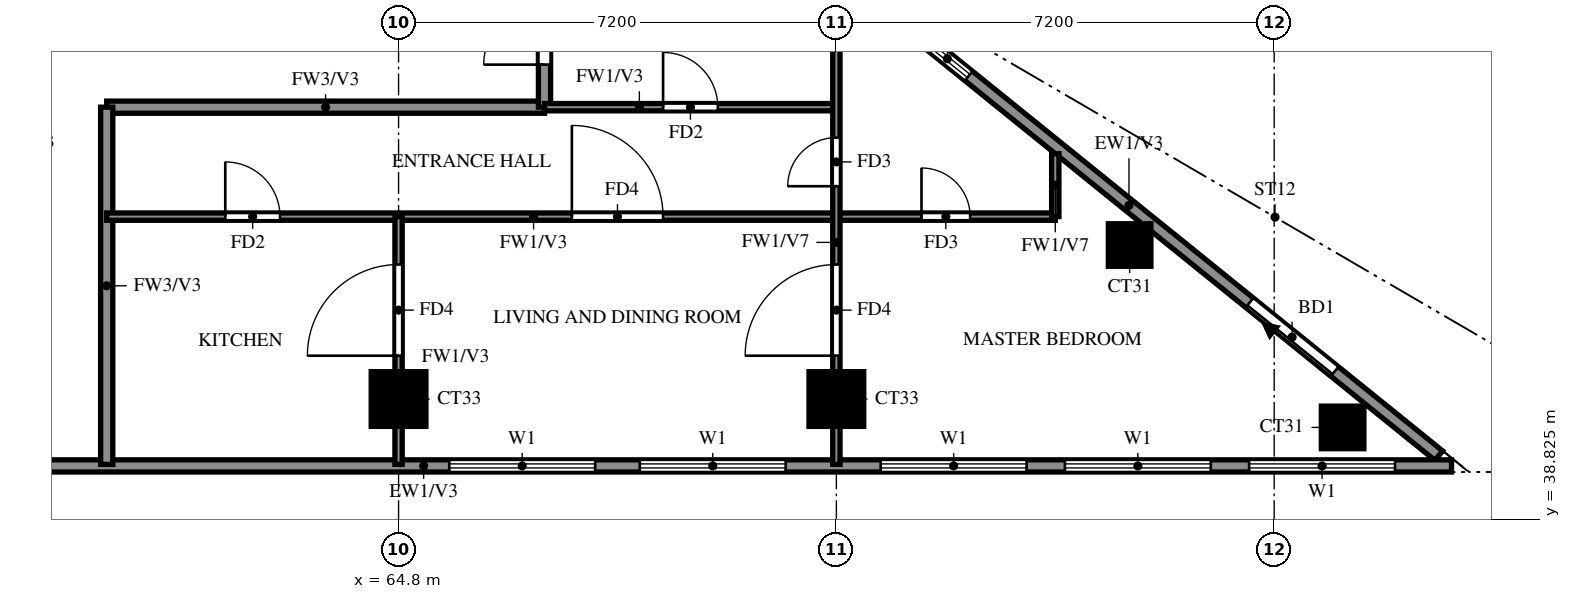
"""IFC4 building model, lengths in metres.
Left out: names, types, materials, properties, quantities, classifications, styles, units other than length and angle.
Written with IfcOpenShell. Run it as: python <this file> out.ifc"""

import sys

from ifc_helpers import new_model, si_unit, direction, frame, frame_2d, origin, origin_2d, place, context, subcontext, project, spatial, rectangle, extrude, source, transform, mapped, element, fill, save


model = new_model("IFC4")
c1 = context("Model", 3, precision=1e-05, world=origin(), true_north=direction((0.0, 1.0)))
c2 = subcontext(c1, "Body", "Model", "MODEL_VIEW")
j1 = project(units=[si_unit("LENGTHUNIT", "METRE"), si_unit("PLANEANGLEUNIT", "RADIAN")], contexts=[c1])
p1 = place(None, origin())
s1 = spatial("IfcSite", under=j1, at=p1, CompositionType="ELEMENT")
p2 = place(p1, origin())
s2 = spatial("IfcBuilding", under=s1, at=p2, CompositionType="ELEMENT")
p3 = place(p2, frame((0.0, 0.0, 211.5)))
s3 = spatial("IfcBuildingStorey", under=s2, at=p3, CompositionType="ELEMENT", Elevation=211.5)
m1 = source(origin(), c2, "Body", "SweptSolid", [
    extrude(rectangle(XDim=0.7, YDim=0.7, at=origin_2d()), origin(), (0.0, 0.0, 1.0), 3.5),
])
p4 = place(p3, frame((80.326, 40.333, -0.28), z_axis=(0.0, 0.0, 1.0), x_axis=(1.0, 0.0, 0.0)))
e1 = element("IfcColumn", 1, at=p4, inside=s3, PredefinedType="COLUMN", context=c2, shape_type="MappedRepresentation", body=[
    mapped(m1, transform((0.0, 0.0, 0.0))),
])
m2 = source(origin(), c2, "Body", "SweptSolid", [
    extrude(rectangle(XDim=0.9, YDim=0.9, at=origin_2d()), origin(), (0.0, 0.0, 1.0), 3.22),
])
for number, where, z_axis, x_axis in (
    (2, (64.8, 40.8, 0.0), (0.0, 0.0, 1.0), (1.0, 0.0, 0.0)),
    (3, (72.0, 40.8, 0.0), (0.0, 0.0, 1.0), (1.0, 0.0, 0.0)),
):
    element("IfcColumn", number, at=place(p3, frame(where, z_axis=z_axis, x_axis=x_axis)), inside=s3, PredefinedType="COLUMN", context=c2, shape_type="MappedRepresentation", body=[
        mapped(m2, transform((0.0, 0.0, 0.0))),
    ])
p5 = place(p3, frame((76.823, 43.333, -0.28), z_axis=(0.0, 0.0, 1.0), x_axis=(1.0, 0.0, 0.0)))
e4 = element("IfcColumn", 4, at=p5, inside=s3, PredefinedType="COLUMN", context=c2, shape_type="MappedRepresentation", body=[
    mapped(m1, transform((0.0, 0.0, 0.0))),
])
p6 = place(p3, frame((81.907, 39.87, 0.0), z_axis=(0.0, 0.0, 1.0), x_axis=(-0.777936274417, 0.62834318087, 0.0)))
e5 = element("IfcWall", 5, at=p6, inside=s3, PredefinedType="SOLIDWALL", context=c2, shape_type="SweptSolid", body=[
    extrude(rectangle(XDim=13.099, YDim=0.2, at=frame_2d((6.549, 0.0))), origin(), (0.0, 0.0, 1.0), 3.22),
])
p7 = place(p6, frame((2.201, 0.0, 0.0)))
e6 = element("IfcOpeningElement", 6, at=p7, cuts=e5, PredefinedType="OPENING", context=c2, shape_type="SweptSolid", body=[
    extrude(rectangle(XDim=1.8, YDim=2.4, at=frame_2d((0.9, 1.2))), frame((0.0, 0.11, 0.0), z_axis=(0.0, -1.0, 0.0), x_axis=(1.0, 0.0, 0.0)), (0.0, 0.0, 1.0), 0.22),
])
p8 = place(p6, frame((9.938, 0.0, 1.5)))
e7 = element("IfcOpeningElement", 7, at=p8, cuts=e5, PredefinedType="OPENING", context=c2, shape_type="SweptSolid", body=[
    extrude(rectangle(XDim=0.9, YDim=0.9, at=frame_2d((0.45, 0.45))), frame((0.0, 0.11, 0.0), z_axis=(0.0, -1.0, 0.0), x_axis=(1.0, 0.0, 0.0)), (0.0, 0.0, 1.0), 0.22),
])
p9 = place(p3, frame((58.8, 39.7, 0.0), z_axis=(0.0, 0.0, 1.0), x_axis=(1.0, 0.0, 0.0)))
e8 = element("IfcWall", 8, at=p9, inside=s3, PredefinedType="SOLIDWALL", context=c2, shape_type="SweptSolid", body=[
    extrude(rectangle(XDim=23.317, YDim=0.2, at=frame_2d((11.658, 0.0))), origin(), (0.0, 0.0, 1.0), 3.22),
])
p10 = place(p9, frame((6.833, 0.0, 0.6)))
e9 = element("IfcOpeningElement", 9, at=p10, cuts=e8, PredefinedType="OPENING", context=c2, shape_type="SweptSolid", body=[
    extrude(rectangle(XDim=2.4, YDim=2.4, at=frame_2d((1.2, 1.2))), frame((0.0, 0.11, 0.0), z_axis=(0.0, -1.0, 0.0), x_axis=(1.0, 0.0, 0.0)), (0.0, 0.0, 1.0), 0.22),
])
p11 = place(p9, frame((9.967, 0.0, 0.6)))
e10 = element("IfcOpeningElement", 10, at=p11, cuts=e8, PredefinedType="OPENING", context=c2, shape_type="SweptSolid", body=[
    extrude(rectangle(XDim=2.4, YDim=2.4, at=frame_2d((1.2, 1.2))), frame((0.0, 0.11, 0.0), z_axis=(0.0, -1.0, 0.0), x_axis=(1.0, 0.0, 0.0)), (0.0, 0.0, 1.0), 0.22),
])
p12 = place(p9, frame((13.929, 0.0, 0.6)))
e11 = element("IfcOpeningElement", 11, at=p12, cuts=e8, PredefinedType="OPENING", context=c2, shape_type="SweptSolid", body=[
    extrude(rectangle(XDim=2.4, YDim=2.4, at=frame_2d((1.2, 1.2))), frame((0.0, 0.11, 0.0), z_axis=(0.0, -1.0, 0.0), x_axis=(1.0, 0.0, 0.0)), (0.0, 0.0, 1.0), 0.22),
])
p13 = place(p9, frame((16.958, 0.0, 0.6)))
e12 = element("IfcOpeningElement", 12, at=p13, cuts=e8, PredefinedType="OPENING", context=c2, shape_type="SweptSolid", body=[
    extrude(rectangle(XDim=2.4, YDim=2.4, at=frame_2d((1.2, 1.2))), frame((0.0, 0.11, 0.0), z_axis=(0.0, -1.0, 0.0), x_axis=(1.0, 0.0, 0.0)), (0.0, 0.0, 1.0), 0.22),
])
p14 = place(p9, frame((19.988, 0.0, 0.6)))
e13 = element("IfcOpeningElement", 13, at=p14, cuts=e8, PredefinedType="OPENING", context=c2, shape_type="SweptSolid", body=[
    extrude(rectangle(XDim=2.4, YDim=2.4, at=frame_2d((1.2, 1.2))), frame((0.0, 0.11, 0.0), z_axis=(0.0, -1.0, 0.0), x_axis=(1.0, 0.0, 0.0)), (0.0, 0.0, 1.0), 0.22),
])
p15 = place(p3, frame((60.0, 45.6, 0.0), z_axis=(0.0, 0.0, 1.0), x_axis=(1.0, 0.0, 0.0)))
e14 = element("IfcWall", 14, at=p15, inside=s3, PredefinedType="SOLIDWALL", context=c2, shape_type="SweptSolid", body=[
    extrude(rectangle(XDim=7.2, YDim=0.2, at=frame_2d((3.6, 0.0))), origin(), (0.0, 0.0, 1.0), 3.22),
])
p16 = place(p3, frame((60.0, 39.725, 0.0), z_axis=(0.0, 0.0, 1.0), x_axis=(0.0, 1.0, 0.0)))
e15 = element("IfcWall", 15, at=p16, inside=s3, PredefinedType="SOLIDWALL", context=c2, shape_type="SweptSolid", body=[
    extrude(rectangle(XDim=5.875, YDim=0.2, at=frame_2d((2.938, 0.0))), origin(), (0.0, 0.0, 1.0), 3.22),
])
p17 = place(p3, frame((67.2, 45.6, 0.0), z_axis=(0.0, 0.0, 1.0), x_axis=(0.0, 1.0, 0.0)))
e16 = element("IfcWall", 16, at=p17, inside=s3, PredefinedType="SOLIDWALL", context=c2, shape_type="SweptSolid", body=[
    extrude(rectangle(XDim=8.4, YDim=0.2, at=frame_2d((4.2, 0.0))), origin(), (0.0, 0.0, 1.0), 3.22),
])
p18 = place(p17, frame((6.7, 0.0, 0.0)))
e17 = element("IfcOpeningElement", 17, at=p18, cuts=e16, PredefinedType="OPENING", context=c2, shape_type="SweptSolid", body=[
    extrude(rectangle(XDim=1.0, YDim=2.1, at=frame_2d((0.5, 1.05))), frame((0.0, 0.11, 0.0), z_axis=(0.0, -1.0, 0.0), x_axis=(1.0, 0.0, 0.0)), (0.0, 0.0, 1.0), 0.22),
])
p19 = place(p17, frame((0.7, 0.0, 0.0)))
e18 = element("IfcOpeningElement", 18, at=p19, cuts=e16, PredefinedType="OPENING", context=c2, shape_type="SweptSolid", body=[
    extrude(rectangle(XDim=1.0, YDim=2.1, at=frame_2d((0.5, 1.05))), frame((0.0, 0.11, 0.0), z_axis=(0.0, -1.0, 0.0), x_axis=(1.0, 0.0, 0.0)), (0.0, 0.0, 1.0), 0.22),
])
p20 = place(p3, frame((60.0, 43.8, 0.0), z_axis=(0.0, 0.0, 1.0), x_axis=(1.0, 0.0, 0.0)))
e19 = element("IfcWall", 19, at=p20, inside=s3, PredefinedType="PARTITIONING", context=c2, shape_type="SweptSolid", body=[
    extrude(rectangle(XDim=15.6, YDim=0.12, at=frame_2d((7.8, 0.0))), origin(), (0.0, 0.0, 1.0), 3.22),
])
p21 = place(p20, frame((7.65, 0.0, 0.0)))
e20 = element("IfcOpeningElement", 20, at=p21, cuts=e19, PredefinedType="OPENING", context=c2, shape_type="SweptSolid", body=[
    extrude(rectangle(XDim=1.5, YDim=2.1, at=frame_2d((0.75, 1.05))), frame((0.0, 0.07, 0.0), z_axis=(0.0, -1.0, 0.0), x_axis=(1.0, 0.0, 0.0)), (0.0, 0.0, 1.0), 0.14),
])
p22 = place(p20, frame((1.95, 0.0, 0.0)))
e21 = element("IfcOpeningElement", 21, at=p22, cuts=e19, PredefinedType="OPENING", context=c2, shape_type="SweptSolid", body=[
    extrude(rectangle(XDim=0.9, YDim=2.1, at=frame_2d((0.45, 1.05))), frame((0.0, 0.07, 0.0), z_axis=(0.0, -1.0, 0.0), x_axis=(1.0, 0.0, 0.0)), (0.0, 0.0, 1.0), 0.14),
])
p23 = place(p20, frame((13.4, 0.0, 0.0)))
e22 = element("IfcOpeningElement", 22, at=p23, cuts=e19, PredefinedType="OPENING", context=c2, shape_type="SweptSolid", body=[
    extrude(rectangle(XDim=0.8, YDim=2.1, at=frame_2d((0.4, 1.05))), frame((0.0, 0.07, 0.0), z_axis=(0.0, -1.0, 0.0), x_axis=(1.0, 0.0, 0.0)), (0.0, 0.0, 1.0), 0.14),
])
p24 = place(p3, frame((67.2, 45.6, 0.0), z_axis=(0.0, 0.0, 1.0), x_axis=(1.0, 0.0, 0.0)))
e23 = element("IfcWall", 23, at=p24, inside=s3, PredefinedType="PARTITIONING", context=c2, shape_type="SweptSolid", body=[
    extrude(rectangle(XDim=4.8, YDim=0.12, at=frame_2d((2.4, 0.0))), origin(), (0.0, 0.0, 1.0), 3.22),
])
p25 = place(p24, frame((1.95, 0.0, 0.0)))
e24 = element("IfcOpeningElement", 24, at=p25, cuts=e23, PredefinedType="OPENING", context=c2, shape_type="SweptSolid", body=[
    extrude(rectangle(XDim=0.9, YDim=2.1, at=frame_2d((0.45, 1.05))), frame((0.0, 0.07, 0.0), z_axis=(0.0, -1.0, 0.0), x_axis=(1.0, 0.0, 0.0)), (0.0, 0.0, 1.0), 0.14),
])
p26 = place(p3, frame((64.8, 39.725, 0.0), z_axis=(0.0, 0.0, 1.0), x_axis=(0.0, 1.0, 0.0)))
e25 = element("IfcWall", 25, at=p26, inside=s3, PredefinedType="PARTITIONING", context=c2, shape_type="SweptSolid", body=[
    extrude(rectangle(XDim=4.075, YDim=0.12, at=frame_2d((2.038, 0.0))), origin(), (0.0, 0.0, 1.0), 3.22),
])
p27 = place(p26, frame((1.788, 0.0, 0.0)))
e26 = element("IfcOpeningElement", 26, at=p27, cuts=e25, PredefinedType="OPENING", context=c2, shape_type="SweptSolid", body=[
    extrude(rectangle(XDim=1.5, YDim=2.1, at=frame_2d((0.75, 1.05))), frame((0.0, 0.07, 0.0), z_axis=(0.0, -1.0, 0.0), x_axis=(1.0, 0.0, 0.0)), (0.0, 0.0, 1.0), 0.14),
])
p28 = place(p3, frame((72.0, 39.725, 0.0), z_axis=(0.0, 0.0, 1.0), x_axis=(0.0, 1.0, 0.0)))
e27 = element("IfcWall", 27, at=p28, inside=s3, PredefinedType="PARTITIONING", context=c2, shape_type="SweptSolid", body=[
    extrude(rectangle(XDim=8.114, YDim=0.12, at=frame_2d((4.057, 0.0))), origin(), (0.0, 0.0, 1.0), 2.32),
])
p29 = place(p28, frame((1.788, 0.0, 0.0)))
e28 = element("IfcOpeningElement", 28, at=p29, cuts=e27, PredefinedType="OPENING", context=c2, shape_type="SweptSolid", body=[
    extrude(rectangle(XDim=1.5, YDim=2.1, at=frame_2d((0.75, 1.05))), frame((0.0, 0.07, 0.0), z_axis=(0.0, -1.0, 0.0), x_axis=(1.0, 0.0, 0.0)), (0.0, 0.0, 1.0), 0.14),
])
p30 = place(p28, frame((4.575, 0.0, 0.0)))
e29 = element("IfcOpeningElement", 29, at=p30, cuts=e27, PredefinedType="OPENING", context=c2, shape_type="SweptSolid", body=[
    extrude(rectangle(XDim=0.8, YDim=2.1, at=frame_2d((0.4, 1.05))), frame((0.0, 0.07, 0.0), z_axis=(0.0, -1.0, 0.0), x_axis=(1.0, 0.0, 0.0)), (0.0, 0.0, 1.0), 0.14),
])
p31 = place(p3, frame((75.6, 43.8, 0.0), z_axis=(0.0, 0.0, 1.0), x_axis=(0.0, 1.0, 0.0)))
e30 = element("IfcWall", 30, at=p31, inside=s3, PredefinedType="PARTITIONING", context=c2, shape_type="SweptSolid", body=[
    extrude(rectangle(XDim=1.035, YDim=0.12, at=frame_2d((0.518, 0.0))), origin(), (0.0, 0.0, 1.0), 2.32),
])
p32 = place(p7, origin())
e31 = element("IfcDoor", 31, at=p32, inside=s3, OperationType="DOUBLE_DOOR_SLIDING", PredefinedType="DOOR", context=c2, shape_type="SweptSolid", body=[
    extrude(rectangle(XDim=1.8, YDim=2.4, at=frame_2d((0.9, 1.2))), frame((0.0, 0.025, 0.0), z_axis=(0.0, -1.0, 0.0), x_axis=(1.0, 0.0, 0.0)), (0.0, 0.0, 1.0), 0.05),
])
fill(e6, e31)
p33 = place(p8, origin())
e32 = element("IfcWindow", 32, at=p33, inside=s3, PartitioningType="SINGLE_PANEL", PredefinedType="WINDOW", context=c2, shape_type="SweptSolid", body=[
    extrude(rectangle(XDim=0.9, YDim=0.9, at=frame_2d((0.45, 0.45))), frame((0.0, 0.03, 0.0), z_axis=(0.0, -1.0, 0.0), x_axis=(1.0, 0.0, 0.0)), (0.0, 0.0, 1.0), 0.06),
])
fill(e7, e32)
p34 = place(p10, origin())
e33 = element("IfcWindow", 33, at=p34, inside=s3, PartitioningType="DOUBLE_PANEL_VERTICAL", PredefinedType="WINDOW", context=c2, shape_type="SweptSolid", body=[
    extrude(rectangle(XDim=2.4, YDim=2.4, at=frame_2d((1.2, 1.2))), frame((0.0, 0.03, 0.0), z_axis=(0.0, -1.0, 0.0), x_axis=(1.0, 0.0, 0.0)), (0.0, 0.0, 1.0), 0.06),
])
fill(e9, e33)
p35 = place(p11, origin())
e34 = element("IfcWindow", 34, at=p35, inside=s3, PartitioningType="DOUBLE_PANEL_VERTICAL", PredefinedType="WINDOW", context=c2, shape_type="SweptSolid", body=[
    extrude(rectangle(XDim=2.4, YDim=2.4, at=frame_2d((1.2, 1.2))), frame((0.0, 0.03, 0.0), z_axis=(0.0, -1.0, 0.0), x_axis=(1.0, 0.0, 0.0)), (0.0, 0.0, 1.0), 0.06),
])
fill(e10, e34)
p36 = place(p12, origin())
e35 = element("IfcWindow", 35, at=p36, inside=s3, PartitioningType="DOUBLE_PANEL_VERTICAL", PredefinedType="WINDOW", context=c2, shape_type="SweptSolid", body=[
    extrude(rectangle(XDim=2.4, YDim=2.4, at=frame_2d((1.2, 1.2))), frame((0.0, 0.03, 0.0), z_axis=(0.0, -1.0, 0.0), x_axis=(1.0, 0.0, 0.0)), (0.0, 0.0, 1.0), 0.06),
])
fill(e11, e35)
p37 = place(p13, origin())
e36 = element("IfcWindow", 36, at=p37, inside=s3, PartitioningType="DOUBLE_PANEL_VERTICAL", PredefinedType="WINDOW", context=c2, shape_type="SweptSolid", body=[
    extrude(rectangle(XDim=2.4, YDim=2.4, at=frame_2d((1.2, 1.2))), frame((0.0, 0.03, 0.0), z_axis=(0.0, -1.0, 0.0), x_axis=(1.0, 0.0, 0.0)), (0.0, 0.0, 1.0), 0.06),
])
fill(e12, e36)
p38 = place(p14, origin())
e37 = element("IfcWindow", 37, at=p38, inside=s3, PartitioningType="DOUBLE_PANEL_VERTICAL", PredefinedType="WINDOW", context=c2, shape_type="SweptSolid", body=[
    extrude(rectangle(XDim=2.4, YDim=2.4, at=frame_2d((1.2, 1.2))), frame((0.0, 0.03, 0.0), z_axis=(0.0, -1.0, 0.0), x_axis=(1.0, 0.0, 0.0)), (0.0, 0.0, 1.0), 0.06),
])
fill(e13, e37)
p39 = place(p27, origin())
e38 = element("IfcDoor", 38, at=p39, inside=s3, OperationType="SINGLE_SWING_RIGHT", PredefinedType="DOOR", context=c2, shape_type="SweptSolid", body=[
    extrude(rectangle(XDim=1.5, YDim=2.1, at=frame_2d((0.75, 1.05))), frame((0.0, 0.025, 0.0), z_axis=(0.0, -1.0, 0.0), x_axis=(1.0, 0.0, 0.0)), (0.0, 0.0, 1.0), 0.05),
])
fill(e26, e38)
p40 = place(p25, origin())
e39 = element("IfcDoor", 39, at=p40, inside=s3, OperationType="SINGLE_SWING_RIGHT", PredefinedType="DOOR", context=c2, shape_type="SweptSolid", body=[
    extrude(rectangle(XDim=0.9, YDim=2.1, at=frame_2d((0.45, 1.05))), frame((0.0, 0.025, 0.0), z_axis=(0.0, -1.0, 0.0), x_axis=(1.0, 0.0, 0.0)), (0.0, 0.0, 1.0), 0.05),
])
fill(e24, e39)
p41 = place(p19, origin())
e40 = element("IfcDoor", 40, at=p41, inside=s3, OperationType="SINGLE_SWING_LEFT", PredefinedType="DOOR", context=c2, shape_type="SweptSolid", body=[
    extrude(rectangle(XDim=1.0, YDim=2.1, at=frame_2d((0.5, 1.05))), frame((0.0, 0.025, 0.0), z_axis=(0.0, -1.0, 0.0), x_axis=(1.0, 0.0, 0.0)), (0.0, 0.0, 1.0), 0.05),
])
fill(e18, e40)
p42 = place(p21, origin())
e41 = element("IfcDoor", 41, at=p42, inside=s3, OperationType="SINGLE_SWING_LEFT", PredefinedType="DOOR", context=c2, shape_type="SweptSolid", body=[
    extrude(rectangle(XDim=1.5, YDim=2.1, at=frame_2d((0.75, 1.05))), frame((0.0, 0.025, 0.0), z_axis=(0.0, -1.0, 0.0), x_axis=(1.0, 0.0, 0.0)), (0.0, 0.0, 1.0), 0.05),
])
fill(e20, e41)
p43 = place(p22, origin())
e42 = element("IfcDoor", 42, at=p43, inside=s3, OperationType="SINGLE_SWING_RIGHT", PredefinedType="DOOR", context=c2, shape_type="SweptSolid", body=[
    extrude(rectangle(XDim=0.9, YDim=2.1, at=frame_2d((0.45, 1.05))), frame((0.0, 0.025, 0.0), z_axis=(0.0, -1.0, 0.0), x_axis=(1.0, 0.0, 0.0)), (0.0, 0.0, 1.0), 0.05),
])
fill(e21, e42)
p44 = place(p29, origin())
e43 = element("IfcDoor", 43, at=p44, inside=s3, OperationType="SINGLE_SWING_RIGHT", PredefinedType="DOOR", context=c2, shape_type="SweptSolid", body=[
    extrude(rectangle(XDim=1.5, YDim=2.1, at=frame_2d((0.75, 1.05))), frame((0.0, 0.025, 0.0), z_axis=(0.0, -1.0, 0.0), x_axis=(1.0, 0.0, 0.0)), (0.0, 0.0, 1.0), 0.05),
])
fill(e28, e43)
p45 = place(p30, origin())
e44 = element("IfcDoor", 44, at=p45, inside=s3, OperationType="SINGLE_SWING_LEFT", PredefinedType="DOOR", context=c2, shape_type="SweptSolid", body=[
    extrude(rectangle(XDim=0.8, YDim=2.1, at=frame_2d((0.4, 1.05))), frame((0.0, 0.025, 0.0), z_axis=(0.0, -1.0, 0.0), x_axis=(1.0, 0.0, 0.0)), (0.0, 0.0, 1.0), 0.05),
])
fill(e29, e44)
p46 = place(p23, origin())
e45 = element("IfcDoor", 45, at=p46, inside=s3, OperationType="SINGLE_SWING_RIGHT", PredefinedType="DOOR", context=c2, shape_type="SweptSolid", body=[
    extrude(rectangle(XDim=0.8, YDim=2.1, at=frame_2d((0.4, 1.05))), frame((0.0, 0.025, 0.0), z_axis=(0.0, -1.0, 0.0), x_axis=(1.0, 0.0, 0.0)), (0.0, 0.0, 1.0), 0.05),
])
fill(e22, e45)
save(model, sys.argv[1])
